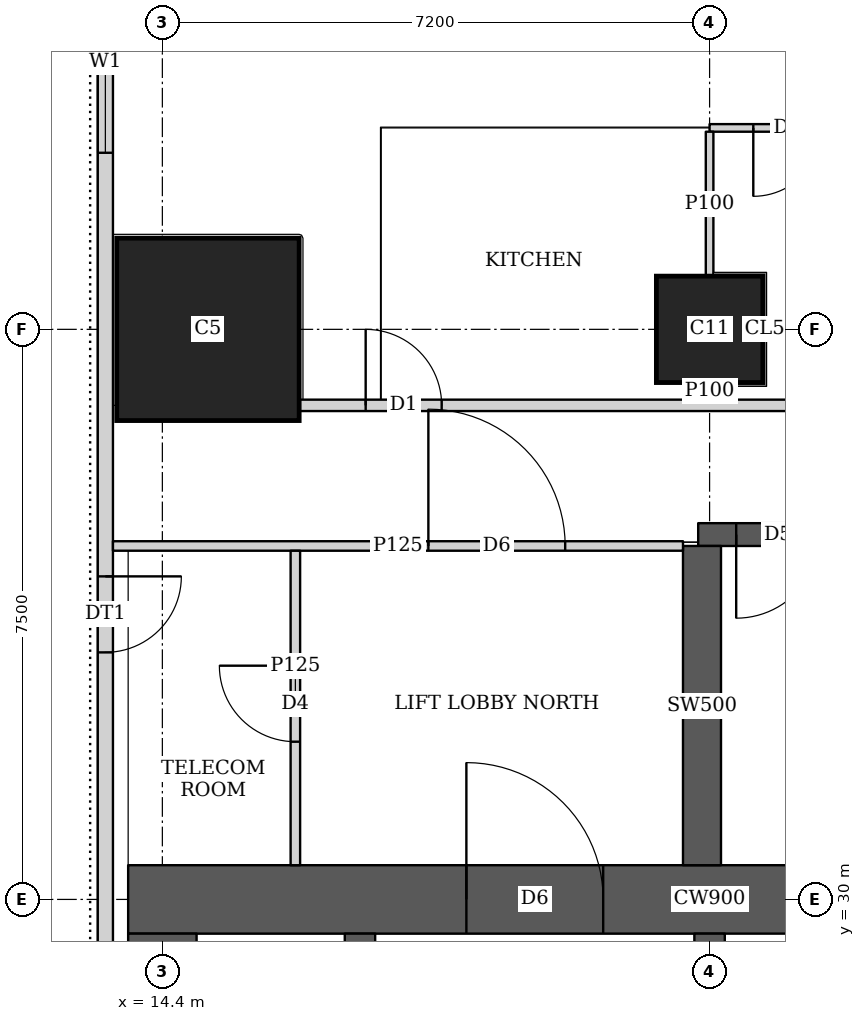
"""IFC4 building model, lengths in metres.
Left out: names, types, materials, properties, quantities, classifications, styles, units other than length and angle.
Written with IfcOpenShell. Run it as: python <this file> out.ifc"""

import sys

from ifc_helpers import new_model, si_unit, direction, frame, frame_2d, origin, origin_2d, place, context, subcontext, project, spatial, rectangle, extrude, element, fill, save


model = new_model("IFC4")
c1 = context("Model", 3, precision=1e-05, world=origin(), true_north=direction((0.0, 1.0)))
c2 = subcontext(c1, "Body", "Model", "MODEL_VIEW")
j1 = project(units=[si_unit("LENGTHUNIT", "METRE"), si_unit("PLANEANGLEUNIT", "RADIAN")], contexts=[c1])
p1 = place(None, origin())
s1 = spatial("IfcSite", under=j1, at=p1, CompositionType="ELEMENT")
p2 = place(p1, origin())
s2 = spatial("IfcBuilding", under=s1, at=p2, CompositionType="ELEMENT")
p3 = place(p2, frame((0.0, 0.0, 223.7)))
s3 = spatial("IfcBuildingStorey", under=s2, at=p3, CompositionType="ELEMENT", Elevation=223.7)
p4 = place(p3, frame((15.0, 37.5, 0.0), z_axis=(0.0, 0.0, 1.0), x_axis=(1.0, 0.0, 0.0)))
e1 = element("IfcColumn", 1, at=p4, inside=s3, PredefinedType="COLUMN", context=c2, shape_type="SweptSolid", body=[
    extrude(rectangle(XDim=2.4, YDim=2.4, at=origin_2d()), origin(), (0.0, 0.0, 1.0), 3.75),
])
p5 = place(p3, frame((21.6, 37.5, 0.0), z_axis=(0.0, 0.0, 1.0), x_axis=(1.0, 0.0, 0.0)))
e2 = element("IfcColumn", 2, at=p5, inside=s3, PredefinedType="COLUMN", context=c2, shape_type="SweptSolid", body=[
    extrude(rectangle(XDim=1.4, YDim=1.4, at=origin_2d()), origin(), (0.0, 0.0, 1.0), 3.75),
])
p6 = place(p3, frame((13.95, 30.0, 0.0), z_axis=(0.0, 0.0, 1.0), x_axis=(1.0, 0.0, 0.0)))
e3 = element("IfcWall", 3, at=p6, inside=s3, PredefinedType="SHEAR", context=c2, shape_type="SweptSolid", body=[
    extrude(rectangle(XDim=15.3, YDim=0.9, at=frame_2d((7.65, 0.0))), origin(), (0.0, 0.0, 1.0), 3.75),
])
p7 = place(p6, frame((4.45, 0.0, 0.0)))
e4 = element("IfcOpeningElement", 4, at=p7, cuts=e3, PredefinedType="OPENING", context=c2, shape_type="SweptSolid", body=[
    extrude(rectangle(XDim=1.8, YDim=2.1, at=frame_2d((0.9, 1.05))), frame((0.0, 0.46, 0.0), z_axis=(0.0, -1.0, 0.0), x_axis=(1.0, 0.0, 0.0)), (0.0, 0.0, 1.0), 0.92),
])
p8 = place(p6, frame((10.7, 0.0, 0.0)))
e5 = element("IfcOpeningElement", 5, at=p8, cuts=e3, PredefinedType="OPENING", context=c2, shape_type="SweptSolid", body=[
    extrude(rectangle(XDim=1.1, YDim=2.1, at=frame_2d((0.55, 1.05))), frame((0.0, 0.46, 0.0), z_axis=(0.0, -1.0, 0.0), x_axis=(1.0, 0.0, 0.0)), (0.0, 0.0, 1.0), 0.92),
])
p9 = place(p3, frame((14.4, 15.45, 0.0), z_axis=(0.0, 0.0, 1.0), x_axis=(0.0, 1.0, 0.0)))
e6 = element("IfcWall", 6, at=p9, inside=s3, PredefinedType="SHEAR", context=c2, shape_type="SweptSolid", body=[
    extrude(rectangle(XDim=14.1, YDim=0.9, at=frame_2d((7.05, 0.0))), origin(), (0.0, 0.0, 1.0), 3.75),
])
p10 = place(p3, frame((17.0, 15.45, 0.0), z_axis=(0.0, 0.0, 1.0), x_axis=(0.0, 1.0, 0.0)))
e7 = element("IfcWall", 7, at=p10, inside=s3, PredefinedType="SHEAR", context=c2, shape_type="SweptSolid", body=[
    extrude(rectangle(XDim=14.1, YDim=0.4, at=frame_2d((7.05, 0.0))), origin(), (0.0, 0.0, 1.0), 3.75),
])
p11 = place(p10, frame((1.05, 0.0, 0.0)))
e8 = element("IfcOpeningElement", 8, at=p11, cuts=e7, PredefinedType="OPENING", context=c2, shape_type="SweptSolid", body=[
    extrude(rectangle(XDim=1.0, YDim=2.1, at=frame_2d((0.5, 1.05))), frame((0.0, 0.21, 0.0), z_axis=(0.0, -1.0, 0.0), x_axis=(1.0, 0.0, 0.0)), (0.0, 0.0, 1.0), 0.42),
])
p12 = place(p10, frame((4.675, 0.0, 0.0)))
e9 = element("IfcOpeningElement", 9, at=p12, cuts=e7, PredefinedType="OPENING", context=c2, shape_type="SweptSolid", body=[
    extrude(rectangle(XDim=1.0, YDim=2.1, at=frame_2d((0.5, 1.05))), frame((0.0, 0.21, 0.0), z_axis=(0.0, -1.0, 0.0), x_axis=(1.0, 0.0, 0.0)), (0.0, 0.0, 1.0), 0.42),
])
p13 = place(p10, frame((8.425, 0.0, 0.0)))
e10 = element("IfcOpeningElement", 10, at=p13, cuts=e7, PredefinedType="OPENING", context=c2, shape_type="SweptSolid", body=[
    extrude(rectangle(XDim=1.0, YDim=2.1, at=frame_2d((0.5, 1.05))), frame((0.0, 0.21, 0.0), z_axis=(0.0, -1.0, 0.0), x_axis=(1.0, 0.0, 0.0)), (0.0, 0.0, 1.0), 0.42),
])
p14 = place(p10, frame((12.175, 0.0, 0.0)))
e11 = element("IfcOpeningElement", 11, at=p14, cuts=e7, PredefinedType="OPENING", context=c2, shape_type="SweptSolid", body=[
    extrude(rectangle(XDim=1.0, YDim=2.1, at=frame_2d((0.5, 1.05))), frame((0.0, 0.21, 0.0), z_axis=(0.0, -1.0, 0.0), x_axis=(1.0, 0.0, 0.0)), (0.0, 0.0, 1.0), 0.42),
])
p15 = place(p3, frame((21.6, 15.45, 0.0), z_axis=(0.0, 0.0, 1.0), x_axis=(0.0, 1.0, 0.0)))
e12 = element("IfcWall", 12, at=p15, inside=s3, PredefinedType="SHEAR", context=c2, shape_type="SweptSolid", body=[
    extrude(rectangle(XDim=14.1, YDim=0.4, at=frame_2d((7.05, 0.0))), origin(), (0.0, 0.0, 1.0), 3.75),
])
p16 = place(p15, frame((0.875, 0.0, 0.0)))
e13 = element("IfcOpeningElement", 13, at=p16, cuts=e12, PredefinedType="OPENING", context=c2, shape_type="SweptSolid", body=[
    extrude(rectangle(XDim=1.1, YDim=2.1, at=frame_2d((0.55, 1.05))), frame((0.0, 0.21, 0.0), z_axis=(0.0, -1.0, 0.0), x_axis=(1.0, 0.0, 0.0)), (0.0, 0.0, 1.0), 0.42),
])
p17 = place(p15, frame((4.625, 0.0, 0.0)))
e14 = element("IfcOpeningElement", 14, at=p17, cuts=e12, PredefinedType="OPENING", context=c2, shape_type="SweptSolid", body=[
    extrude(rectangle(XDim=1.1, YDim=2.1, at=frame_2d((0.55, 1.05))), frame((0.0, 0.21, 0.0), z_axis=(0.0, -1.0, 0.0), x_axis=(1.0, 0.0, 0.0)), (0.0, 0.0, 1.0), 0.42),
])
p18 = place(p15, frame((8.375, 0.0, 0.0)))
e15 = element("IfcOpeningElement", 15, at=p18, cuts=e12, PredefinedType="OPENING", context=c2, shape_type="SweptSolid", body=[
    extrude(rectangle(XDim=1.1, YDim=2.1, at=frame_2d((0.55, 1.05))), frame((0.0, 0.21, 0.0), z_axis=(0.0, -1.0, 0.0), x_axis=(1.0, 0.0, 0.0)), (0.0, 0.0, 1.0), 0.42),
])
p19 = place(p15, frame((12.125, 0.0, 0.0)))
e16 = element("IfcOpeningElement", 16, at=p19, cuts=e12, PredefinedType="OPENING", context=c2, shape_type="SweptSolid", body=[
    extrude(rectangle(XDim=1.1, YDim=2.1, at=frame_2d((0.55, 1.05))), frame((0.0, 0.21, 0.0), z_axis=(0.0, -1.0, 0.0), x_axis=(1.0, 0.0, 0.0)), (0.0, 0.0, 1.0), 0.42),
])
p20 = place(p3, frame((21.45, 34.8, 0.0), z_axis=(0.0, 0.0, 1.0), x_axis=(1.0, 0.0, 0.0)))
e17 = element("IfcWall", 17, at=p20, inside=s3, PredefinedType="SHEAR", context=c2, shape_type="SweptSolid", body=[
    extrude(rectangle(XDim=7.5, YDim=0.3, at=frame_2d((3.75, 0.0))), origin(), (0.0, 0.0, 1.0), 3.75),
])
p21 = place(p20, frame((0.5, 0.0, 0.0)))
e18 = element("IfcOpeningElement", 18, at=p21, cuts=e17, PredefinedType="OPENING", context=c2, shape_type="SweptSolid", body=[
    extrude(rectangle(XDim=1.1, YDim=2.1, at=frame_2d((0.55, 1.05))), frame((0.0, 0.16, 0.0), z_axis=(0.0, -1.0, 0.0), x_axis=(1.0, 0.0, 0.0)), (0.0, 0.0, 1.0), 0.32),
])
p22 = place(p3, frame((21.5, 30.45, 0.0), z_axis=(0.0, 0.0, 1.0), x_axis=(0.0, 1.0, 0.0)))
e19 = element("IfcWall", 19, at=p22, inside=s3, PredefinedType="SHEAR", context=c2, shape_type="SweptSolid", body=[
    extrude(rectangle(XDim=4.2, YDim=0.5, at=frame_2d((2.1, 0.0))), origin(), (0.0, 0.0, 1.0), 3.75),
])
p23 = place(p3, frame((13.65, 44.837, 0.0), z_axis=(0.0, 0.0, 1.0), x_axis=(0.0, -1.0, 0.0)))
e20 = element("IfcWall", 20, at=p23, inside=s3, PredefinedType="SOLIDWALL", context=c2, shape_type="SweptSolid", body=[
    extrude(rectangle(XDim=44.674, YDim=0.2, at=frame_2d((22.337, 0.0))), origin(), (0.0, 0.0, 1.0), 3.5),
])
p24 = place(p23, frame((2.614, 0.0, 0.9)))
e21 = element("IfcOpeningElement", 21, at=p24, cuts=e20, PredefinedType="OPENING", context=c2, shape_type="SweptSolid", body=[
    extrude(rectangle(XDim=2.4, YDim=1.5, at=frame_2d((1.2, 0.75))), frame((0.0, 0.11, 0.0), z_axis=(0.0, -1.0, 0.0), x_axis=(1.0, 0.0, 0.0)), (0.0, 0.0, 1.0), 0.22),
])
p25 = place(p23, frame((39.333, 0.0, 0.9)))
e22 = element("IfcOpeningElement", 22, at=p25, cuts=e20, PredefinedType="OPENING", context=c2, shape_type="SweptSolid", body=[
    extrude(rectangle(XDim=2.4, YDim=1.5, at=frame_2d((1.2, 0.75))), frame((0.0, 0.11, 0.0), z_axis=(0.0, -1.0, 0.0), x_axis=(1.0, 0.0, 0.0)), (0.0, 0.0, 1.0), 0.22),
])
p26 = place(p23, frame((33.087, 0.0, 0.0)))
e23 = element("IfcOpeningElement", 23, at=p26, cuts=e20, PredefinedType="OPENING", context=c2, shape_type="SweptSolid", body=[
    extrude(rectangle(XDim=1.0, YDim=2.4, at=frame_2d((0.5, 1.2))), frame((0.0, 0.11, 0.0), z_axis=(0.0, -1.0, 0.0), x_axis=(1.0, 0.0, 0.0)), (0.0, 0.0, 1.0), 0.22),
])
p27 = place(p23, frame((10.587, 0.0, 0.0)))
e24 = element("IfcOpeningElement", 24, at=p27, cuts=e20, PredefinedType="OPENING", context=c2, shape_type="SweptSolid", body=[
    extrude(rectangle(XDim=1.0, YDim=2.4, at=frame_2d((0.5, 1.2))), frame((0.0, 0.11, 0.0), z_axis=(0.0, -1.0, 0.0), x_axis=(1.0, 0.0, 0.0)), (0.0, 0.0, 1.0), 0.22),
])
p28 = place(p3, frame((16.201, 36.5, 0.0), z_axis=(0.0, 0.0, 1.0), x_axis=(1.0, 0.0, 0.0)))
e25 = element("IfcWall", 25, at=p28, inside=s3, PredefinedType="SOLIDWALL", context=c2, shape_type="SweptSolid", body=[
    extrude(rectangle(XDim=18.564, YDim=0.15, at=frame_2d((9.282, 0.0))), origin(), (0.0, 0.0, 1.0), 3.5),
])
p29 = place(p28, frame((0.874, 0.0, 0.0)))
e26 = element("IfcOpeningElement", 26, at=p29, cuts=e25, PredefinedType="OPENING", context=c2, shape_type="SweptSolid", body=[
    extrude(rectangle(XDim=1.0, YDim=2.1, at=frame_2d((0.5, 1.05))), frame((0.0, 0.085, 0.0), z_axis=(0.0, -1.0, 0.0), x_axis=(1.0, 0.0, 0.0)), (0.0, 0.0, 1.0), 0.17),
])
p30 = place(p28, frame((10.156, 0.0, 0.0)))
e27 = element("IfcOpeningElement", 27, at=p30, cuts=e25, PredefinedType="OPENING", context=c2, shape_type="SweptSolid", body=[
    extrude(rectangle(XDim=1.0, YDim=2.1, at=frame_2d((0.5, 1.05))), frame((0.0, 0.085, 0.0), z_axis=(0.0, -1.0, 0.0), x_axis=(1.0, 0.0, 0.0)), (0.0, 0.0, 1.0), 0.17),
])
p31 = place(p3, frame((21.6, 40.15, 0.0), z_axis=(0.0, 0.0, 1.0), x_axis=(1.0, 0.0, 0.0)))
e28 = element("IfcWall", 28, at=p31, inside=s3, PredefinedType="PARTITIONING", context=c2, shape_type="SweptSolid", body=[
    extrude(rectangle(XDim=3.475, YDim=0.1, at=frame_2d((1.737, 0.0))), origin(), (0.0, 0.0, 1.0), 3.5),
])
p32 = place(p31, frame((0.575, 0.0, 0.0)))
e29 = element("IfcOpeningElement", 29, at=p32, cuts=e28, PredefinedType="OPENING", context=c2, shape_type="SweptSolid", body=[
    extrude(rectangle(XDim=0.9, YDim=2.1, at=frame_2d((0.45, 1.05))), frame((0.0, 0.06, 0.0), z_axis=(0.0, -1.0, 0.0), x_axis=(1.0, 0.0, 0.0)), (0.0, 0.0, 1.0), 0.12),
])
p33 = place(p31, frame((2.375, 0.0, 0.0)))
e30 = element("IfcOpeningElement", 30, at=p33, cuts=e28, PredefinedType="OPENING", context=c2, shape_type="SweptSolid", body=[
    extrude(rectangle(XDim=0.9, YDim=2.1, at=frame_2d((0.45, 1.05))), frame((0.0, 0.06, 0.0), z_axis=(0.0, -1.0, 0.0), x_axis=(1.0, 0.0, 0.0)), (0.0, 0.0, 1.0), 0.12),
])
p34 = place(p3, frame((21.6, 36.575, 0.0), z_axis=(0.0, 0.0, 1.0), x_axis=(0.0, 1.0, 0.0)))
e31 = element("IfcWall", 31, at=p34, inside=s3, PredefinedType="PARTITIONING", context=c2, shape_type="SweptSolid", body=[
    extrude(rectangle(XDim=0.224, YDim=0.1, at=frame_2d((0.112, 0.0))), origin(), (0.0, 0.0, 1.0), 3.5),
])
p35 = place(p3, frame((21.6, 38.201, 0.0), z_axis=(0.0, 0.0, 1.0), x_axis=(0.0, 1.0, 0.0)))
e32 = element("IfcWall", 32, at=p35, inside=s3, PredefinedType="PARTITIONING", context=c2, shape_type="SweptSolid", body=[
    extrude(rectangle(XDim=1.899, YDim=0.1, at=frame_2d((0.95, 0.0))), origin(), (0.0, 0.0, 1.0), 3.5),
])
p36 = place(p3, frame((13.75, 34.65, 0.0), z_axis=(0.0, 0.0, 1.0), x_axis=(1.0, 0.0, 0.0)))
e33 = element("IfcWall", 33, at=p36, inside=s3, PredefinedType="PARTITIONING", context=c2, shape_type="SweptSolid", body=[
    extrude(rectangle(XDim=7.5, YDim=0.125, at=frame_2d((3.75, 0.0))), origin(), (0.0, 0.0, 1.0), 3.5),
])
p37 = place(p36, frame((4.15, 0.0, 0.0)))
e34 = element("IfcOpeningElement", 34, at=p37, cuts=e33, PredefinedType="OPENING", context=c2, shape_type="SweptSolid", body=[
    extrude(rectangle(XDim=1.8, YDim=2.1, at=frame_2d((0.9, 1.05))), frame((0.0, 0.073, 0.0), z_axis=(0.0, -1.0, 0.0), x_axis=(1.0, 0.0, 0.0)), (0.0, 0.0, 1.0), 0.145),
])
p38 = place(p3, frame((16.15, 30.45, 0.0), z_axis=(0.0, 0.0, 1.0), x_axis=(0.0, 1.0, 0.0)))
e35 = element("IfcWall", 35, at=p38, inside=s3, PredefinedType="PARTITIONING", context=c2, shape_type="SweptSolid", body=[
    extrude(rectangle(XDim=4.137, YDim=0.125, at=frame_2d((2.068, 0.0))), origin(), (0.0, 0.0, 1.0), 3.5),
])
p39 = place(p38, frame((1.625, 0.0, 0.0)))
e36 = element("IfcOpeningElement", 36, at=p39, cuts=e35, PredefinedType="OPENING", context=c2, shape_type="SweptSolid", body=[
    extrude(rectangle(XDim=1.0, YDim=2.1, at=frame_2d((0.5, 1.05))), frame((0.0, 0.073, 0.0), z_axis=(0.0, -1.0, 0.0), x_axis=(1.0, 0.0, 0.0)), (0.0, 0.0, 1.0), 0.145),
])
p40 = place(p24, origin())
e37 = element("IfcWindow", 37, at=p40, inside=s3, PartitioningType="SINGLE_PANEL", PredefinedType="WINDOW", context=c2, shape_type="SweptSolid", body=[
    extrude(rectangle(XDim=2.4, YDim=1.5, at=frame_2d((1.2, 0.75))), frame((0.0, 0.03, 0.0), z_axis=(0.0, -1.0, 0.0), x_axis=(1.0, 0.0, 0.0)), (0.0, 0.0, 1.0), 0.06),
])
fill(e21, e37)
p41 = place(p27, origin())
e38 = element("IfcDoor", 38, at=p41, inside=s3, OperationType="SINGLE_SWING_RIGHT", PredefinedType="DOOR", context=c2, shape_type="SweptSolid", body=[
    extrude(rectangle(XDim=1.0, YDim=2.4, at=frame_2d((0.5, 1.2))), frame((0.0, 0.025, 0.0), z_axis=(0.0, -1.0, 0.0), x_axis=(1.0, 0.0, 0.0)), (0.0, 0.0, 1.0), 0.05),
])
fill(e24, e38)
p42 = place(p32, origin())
e39 = element("IfcDoor", 39, at=p42, inside=s3, OperationType="SINGLE_SWING_RIGHT", PredefinedType="DOOR", context=c2, shape_type="SweptSolid", body=[
    extrude(rectangle(XDim=0.9, YDim=2.1, at=frame_2d((0.45, 1.05))), frame((0.0, 0.025, 0.0), z_axis=(0.0, -1.0, 0.0), x_axis=(1.0, 0.0, 0.0)), (0.0, 0.0, 1.0), 0.05),
])
fill(e29, e39)
p43 = place(p29, origin())
e40 = element("IfcDoor", 40, at=p43, inside=s3, OperationType="SINGLE_SWING_LEFT", PredefinedType="DOOR", context=c2, shape_type="SweptSolid", body=[
    extrude(rectangle(XDim=1.0, YDim=2.1, at=frame_2d((0.5, 1.05))), frame((0.0, 0.025, 0.0), z_axis=(0.0, -1.0, 0.0), x_axis=(1.0, 0.0, 0.0)), (0.0, 0.0, 1.0), 0.05),
])
fill(e26, e40)
p44 = place(p39, origin())
e41 = element("IfcDoor", 41, at=p44, inside=s3, OperationType="SINGLE_SWING_RIGHT", PredefinedType="DOOR", context=c2, shape_type="SweptSolid", body=[
    extrude(rectangle(XDim=1.0, YDim=2.1, at=frame_2d((0.5, 1.05))), frame((0.0, 0.025, 0.0), z_axis=(0.0, -1.0, 0.0), x_axis=(1.0, 0.0, 0.0)), (0.0, 0.0, 1.0), 0.05),
])
fill(e36, e41)
p45 = place(p37, origin())
e42 = element("IfcDoor", 42, at=p45, inside=s3, OperationType="DOUBLE_DOOR_SINGLE_SWING", PredefinedType="DOOR", context=c2, shape_type="SweptSolid", body=[
    extrude(rectangle(XDim=1.8, YDim=2.1, at=frame_2d((0.9, 1.05))), frame((0.0, 0.025, 0.0), z_axis=(0.0, -1.0, 0.0), x_axis=(1.0, 0.0, 0.0)), (0.0, 0.0, 1.0), 0.05),
])
fill(e34, e42)
p46 = place(p7, origin())
e43 = element("IfcDoor", 43, at=p46, inside=s3, OperationType="DOUBLE_DOOR_SINGLE_SWING", PredefinedType="DOOR", context=c2, shape_type="SweptSolid", body=[
    extrude(rectangle(XDim=1.8, YDim=2.1, at=frame_2d((0.9, 1.05))), frame((0.0, 0.025, 0.0), z_axis=(0.0, -1.0, 0.0), x_axis=(1.0, 0.0, 0.0)), (0.0, 0.0, 1.0), 0.05),
])
fill(e4, e43)
p47 = place(p21, origin())
e44 = element("IfcDoor", 44, at=p47, inside=s3, OperationType="SINGLE_SWING_RIGHT", PredefinedType="DOOR", context=c2, shape_type="SweptSolid", body=[
    extrude(rectangle(XDim=1.1, YDim=2.1, at=frame_2d((0.55, 1.05))), frame((0.0, 0.025, 0.0), z_axis=(0.0, -1.0, 0.0), x_axis=(1.0, 0.0, 0.0)), (0.0, 0.0, 1.0), 0.05),
])
fill(e18, e44)
save(model, sys.argv[1])
